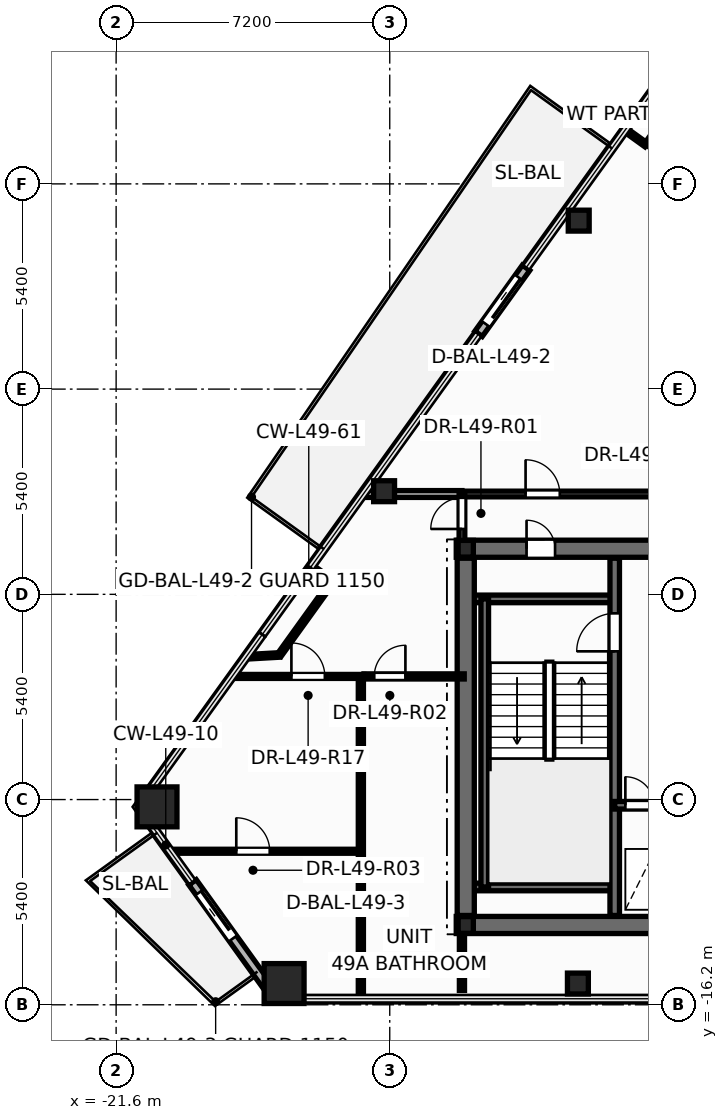
"""IFC4 building model, lengths in metres.
Left out: names, types, materials, properties, quantities, classifications, styles, units other than length and angle.
Written with IfcOpenShell. Run it as: python <this file> out.ifc"""

import sys

from ifc_helpers import new_model, si_unit, direction, frame, frame_2d, origin, origin_2d, place, context, subcontext, project, spatial, rectangle, hollow_rectangle, hollow_circle, i_section, extrude, element, fill, save


model = new_model("IFC4")
c1 = context("Model", 3, precision=1e-05, world=origin(), true_north=direction((0.0, 1.0)))
c2 = subcontext(c1, "Body", "Model", "MODEL_VIEW")
j1 = project(units=[si_unit("LENGTHUNIT", "METRE"), si_unit("PLANEANGLEUNIT", "RADIAN")], contexts=[c1])
p1 = place(None, origin())
s1 = spatial("IfcSite", under=j1, at=p1, CompositionType="ELEMENT")
p2 = place(p1, origin())
s2 = spatial("IfcBuilding", under=s1, at=p2, CompositionType="ELEMENT")
p3 = place(p2, frame((0.0, 0.0, 189.3)))
s3 = spatial("IfcBuildingStorey", under=s2, at=p3, CompositionType="ELEMENT", Elevation=189.3)
for number, where, z_axis, x_axis in (
    (1, (-20.524, -10.992, 0.0), (0.0, 0.0, 1.0), (1.0, 0.0, 0.0)),
    (2, (-17.18, -15.641, 0.0), (0.0, 0.0, 1.0), (1.0, 0.0, 0.0)),
):
    element("IfcColumn", number, at=place(p3, frame(where, z_axis=z_axis, x_axis=x_axis)), inside=s3, PredefinedType="COLUMN", context=c2, shape_type="SweptSolid", body=[
        extrude(hollow_rectangle(XDim=1.05, YDim=1.05, WallThickness=0.045, at=origin_2d()), origin(), (0.0, 0.0, 1.0), 3.6),
    ])
for number, where, z_axis, x_axis in (
    (3, (-9.449, -15.641, 0.0), (0.0, 0.0, 1.0), (1.0, 0.0, 0.0)),
    (4, (-9.427, 4.433, 0.0), (0.0, 0.0, 1.0), (1.0, 0.0, 0.0)),
    (5, (-14.549, -2.686, 0.0), (0.0, 0.0, 1.0), (1.0, 0.0, 0.0)),
):
    element("IfcColumn", number, at=place(p3, frame(where, z_axis=z_axis, x_axis=x_axis)), inside=s3, PredefinedType="COLUMN", context=c2, shape_type="SweptSolid", body=[
        extrude(hollow_circle(Radius=0.275, WallThickness=0.024, at=origin_2d()), origin(), (0.0, 0.0, 1.0), 3.6),
    ])
for number, where, z_axis, x_axis in (
    (6, (-12.4, -14.1, 0.0), (0.0, 0.0, 1.0), (1.0, 0.0, 0.0)),
    (7, (-12.4, -4.2, 0.0), (0.0, 0.0, 1.0), (1.0, 0.0, 0.0)),
):
    element("IfcColumn", number, at=place(p3, frame(where, z_axis=z_axis, x_axis=x_axis)), inside=s3, PredefinedType="COLUMN", context=c2, shape_type="SweptSolid", body=[
        extrude(i_section(OverallWidth=0.4, OverallDepth=0.44, WebThickness=0.028, FlangeThickness=0.04, at=origin_2d()), origin(), (0.0, 0.0, 1.0), 3.6),
    ])
p4 = place(p3, frame((-10.813, 3.192, -0.015), z_axis=(0.0, 0.0, 1.0), x_axis=(-0.583965085393, -0.811778774693, 0.0)))
e8 = element("IfcWall", 8, at=p4, inside=s3, PredefinedType="STANDARD", context=c2, shape_type="SweptSolid", body=[
    extrude(rectangle(XDim=2.14, YDim=0.24, at=frame_2d((1.07, 0.0))), origin(), (0.0, 0.0, 1.0), 2.807),
])
p5 = place(p4, frame((0.32, 0.0, 0.015)))
e9 = element("IfcOpeningElement", 9, at=p5, cuts=e8, PredefinedType="OPENING", context=c2, shape_type="SweptSolid", body=[
    extrude(rectangle(XDim=1.506, YDim=2.204, at=frame_2d((0.75, 1.102))), frame((0.0, 0.13, 0.0), z_axis=(0.0, -1.0, 0.0), x_axis=(1.0, 0.0, 0.0)), (0.0, 0.0, 1.0), 0.26),
])
p6 = place(p3, frame((-19.589, -12.977, -0.015), z_axis=(0.0, 0.0, 1.0), x_axis=(0.583992964187, -0.811758718943, 0.0)))
e10 = element("IfcWall", 10, at=p6, inside=s3, PredefinedType="STANDARD", context=c2, shape_type="SweptSolid", body=[
    extrude(rectangle(XDim=3.734, YDim=0.24, at=frame_2d((1.867, 0.0))), origin(), (0.0, 0.0, 1.0), 2.807),
])
p7 = place(p6, frame((0.32, 0.0, 0.015)))
e11 = element("IfcOpeningElement", 11, at=p7, cuts=e10, PredefinedType="OPENING", context=c2, shape_type="SweptSolid", body=[
    extrude(rectangle(XDim=1.506, YDim=2.204, at=frame_2d((0.75, 1.102))), frame((0.0, 0.13, 0.0), z_axis=(0.0, -1.0, 0.0), x_axis=(1.0, 0.0, 0.0)), (0.0, 0.0, 1.0), 0.26),
])
p8 = place(p3, frame((-12.65, -14.1, 0.0), z_axis=(0.0, 0.0, 1.0), x_axis=(1.0, 0.0, 0.0)))
e12 = element("IfcWall", 12, at=p8, inside=s3, PredefinedType="SHEAR", context=c2, shape_type="SweptSolid", body=[
    extrude(rectangle(XDim=25.3, YDim=0.45, at=frame_2d((12.65, 0.0))), origin(), (0.0, 0.0, 1.0), 3.6),
])
p9 = place(p3, frame((-12.65, -4.2, 0.0), z_axis=(0.0, 0.0, 1.0), x_axis=(1.0, 0.0, 0.0)))
e13 = element("IfcWall", 13, at=p9, inside=s3, PredefinedType="SHEAR", context=c2, shape_type="SweptSolid", body=[
    extrude(rectangle(XDim=25.3, YDim=0.45, at=frame_2d((12.65, 0.0))), origin(), (0.0, 0.0, 1.0), 3.6),
])
p10 = place(p9, frame((1.85, 0.0, 0.0)))
e14 = element("IfcOpeningElement", 14, at=p10, cuts=e13, PredefinedType="OPENING", context=c2, shape_type="SweptSolid", body=[
    extrude(rectangle(XDim=0.756, YDim=2.054, at=frame_2d((0.375, 1.027))), frame((0.0, 0.235, 0.0), z_axis=(0.0, -1.0, 0.0), x_axis=(1.0, 0.0, 0.0)), (0.0, 0.0, 1.0), 0.47),
])
p11 = place(p9, frame((21.85, 0.0, 0.0)))
e15 = element("IfcOpeningElement", 15, at=p11, cuts=e13, PredefinedType="OPENING", context=c2, shape_type="SweptSolid", body=[
    extrude(rectangle(XDim=0.756, YDim=2.054, at=frame_2d((0.375, 1.027))), frame((0.0, 0.235, 0.0), z_axis=(0.0, -1.0, 0.0), x_axis=(1.0, 0.0, 0.0)), (0.0, 0.0, 1.0), 0.47),
])
p12 = place(p9, frame((23.5, 0.0, 0.0)))
e16 = element("IfcOpeningElement", 16, at=p12, cuts=e13, PredefinedType="OPENING", context=c2, shape_type="SweptSolid", body=[
    extrude(rectangle(XDim=0.756, YDim=2.054, at=frame_2d((0.375, 1.027))), frame((0.0, 0.235, 0.0), z_axis=(0.0, -1.0, 0.0), x_axis=(1.0, 0.0, 0.0)), (0.0, 0.0, 1.0), 0.47),
])
p13 = place(p9, frame((5.85, 0.0, 0.0)))
e17 = element("IfcOpeningElement", 17, at=p13, cuts=e13, PredefinedType="OPENING", context=c2, shape_type="SweptSolid", body=[
    extrude(rectangle(XDim=1.006, YDim=2.104, at=frame_2d((0.5, 1.052))), frame((0.0, 0.235, 0.0), z_axis=(0.0, -1.0, 0.0), x_axis=(1.0, 0.0, 0.0)), (0.0, 0.0, 1.0), 0.47),
])
p14 = place(p9, frame((10.35, 0.0, 0.0)))
e18 = element("IfcOpeningElement", 18, at=p14, cuts=e13, PredefinedType="OPENING", context=c2, shape_type="SweptSolid", body=[
    extrude(rectangle(XDim=1.406, YDim=2.154, at=frame_2d((0.7, 1.077))), frame((0.0, 0.235, 0.0), z_axis=(0.0, -1.0, 0.0), x_axis=(1.0, 0.0, 0.0)), (0.0, 0.0, 1.0), 0.47),
])
p15 = place(p9, frame((18.45, 0.0, 0.0)))
e19 = element("IfcOpeningElement", 19, at=p15, cuts=e13, PredefinedType="OPENING", context=c2, shape_type="SweptSolid", body=[
    extrude(rectangle(XDim=1.006, YDim=2.104, at=frame_2d((0.5, 1.052))), frame((0.0, 0.235, 0.0), z_axis=(0.0, -1.0, 0.0), x_axis=(1.0, 0.0, 0.0)), (0.0, 0.0, 1.0), 0.47),
])
for number, where, z_axis, x_axis in (
    (20, (-12.35, -5.52, 0.0), (0.0, 0.0, 1.0), (1.0, 0.0, 0.0)),
    (21, (-12.35, -13.1, 0.0), (0.0, 0.0, 1.0), (1.0, 0.0, 0.0)),
):
    element("IfcWall", number, at=place(p3, frame(where, z_axis=z_axis, x_axis=x_axis)), inside=s3, PredefinedType="SOLIDWALL", context=c2, shape_type="SweptSolid", body=[
        extrude(rectangle(XDim=3.87, YDim=0.2, at=frame_2d((1.935, 0.0))), origin(), (0.0, 0.0, 1.0), 3.6),
    ])
p16 = place(p3, frame((-11.9, -13.1, 0.0), z_axis=(0.0, 0.0, 1.0), x_axis=(0.0, 1.0, 0.0)))
e22 = element("IfcWall", 22, at=p16, inside=s3, PredefinedType="SOLIDWALL", context=c2, shape_type="SweptSolid", body=[
    extrude(rectangle(XDim=7.58, YDim=0.2, at=frame_2d((3.79, 0.0))), origin(), (0.0, 0.0, 1.0), 3.6),
])
p17 = place(p3, frame((-8.48, -13.85, 0.0), z_axis=(0.0, 0.0, 1.0), x_axis=(0.0, 1.0, 0.0)))
e23 = element("IfcWall", 23, at=p17, inside=s3, PredefinedType="SHEAR", context=c2, shape_type="SweptSolid", body=[
    extrude(rectangle(XDim=9.4, YDim=0.25, at=frame_2d((4.7, 0.0))), origin(), (0.0, 0.0, 1.0), 3.6),
])
p18 = place(p17, frame((6.95, 0.0, 0.0)))
e24 = element("IfcOpeningElement", 24, at=p18, cuts=e23, PredefinedType="OPENING", context=c2, shape_type="SweptSolid", body=[
    extrude(rectangle(XDim=1.006, YDim=2.104, at=frame_2d((0.5, 1.052))), frame((0.0, 0.135, 0.0), z_axis=(0.0, -1.0, 0.0), x_axis=(1.0, 0.0, 0.0)), (0.0, 0.0, 1.0), 0.27),
])
p19 = place(p3, frame((-8.48, -10.95, 0.0), z_axis=(0.0, 0.0, 1.0), x_axis=(1.0, 0.0, 0.0)))
e25 = element("IfcWall", 25, at=p19, inside=s3, PredefinedType="SOLIDWALL", context=c2, shape_type="SweptSolid", body=[
    extrude(rectangle(XDim=3.36, YDim=0.2, at=frame_2d((1.68, 0.0))), origin(), (0.0, 0.0, 1.0), 3.6),
])
p20 = place(p19, frame((0.28, 0.0, 0.0)))
e26 = element("IfcOpeningElement", 26, at=p20, cuts=e25, PredefinedType="OPENING", context=c2, shape_type="SweptSolid", body=[
    extrude(rectangle(XDim=0.756, YDim=2.054, at=frame_2d((0.375, 1.027))), frame((0.0, 0.11, 0.0), z_axis=(0.0, -1.0, 0.0), x_axis=(1.0, 0.0, 0.0)), (0.0, 0.0, 1.0), 0.22),
])
p21 = place(p19, frame((1.85, 0.0, 0.0)))
e27 = element("IfcOpeningElement", 27, at=p21, cuts=e25, PredefinedType="OPENING", context=c2, shape_type="SweptSolid", body=[
    extrude(rectangle(XDim=1.106, YDim=2.104, at=frame_2d((0.55, 1.052))), frame((0.0, 0.11, 0.0), z_axis=(0.0, -1.0, 0.0), x_axis=(1.0, 0.0, 0.0)), (0.0, 0.0, 1.0), 0.22),
])
p22 = place(p3, frame((-12.4, -13.85, 0.0), z_axis=(0.0, 0.0, 1.0), x_axis=(0.0, 1.0, 0.0)))
e28 = element("IfcWall", 28, at=p22, inside=s3, PredefinedType="SHEAR", context=c2, shape_type="SweptSolid", body=[
    extrude(rectangle(XDim=9.4, YDim=0.45, at=frame_2d((4.7, 0.0))), origin(), (0.0, 0.0, 1.0), 3.6),
])
p23 = place(p3, frame((-12.5, -2.76, 0.0), z_axis=(0.0, 0.0, 1.0), x_axis=(1.0, 0.0, 0.0)))
e29 = element("IfcWall", 29, at=p23, inside=s3, PredefinedType="PARTITIONING", context=c2, shape_type="SweptSolid", body=[
    extrude(rectangle(XDim=6.76, YDim=0.15, at=frame_2d((3.38, 0.0))), origin(), (0.0, 0.0, 1.0), 2.325),
])
p24 = place(p23, frame((1.675, 0.0, 0.0)))
e30 = element("IfcOpeningElement", 30, at=p24, cuts=e29, PredefinedType="OPENING", context=c2, shape_type="SweptSolid", body=[
    extrude(rectangle(XDim=0.906, YDim=2.104, at=frame_2d((0.45, 1.052))), frame((0.0, 0.085, 0.0), z_axis=(0.0, -1.0, 0.0), x_axis=(1.0, 0.0, 0.0)), (0.0, 0.0, 1.0), 0.17),
])
p25 = place(p3, frame((-20.177, -12.16, 0.0), z_axis=(0.0, 0.0, 1.0), x_axis=(1.0, 0.0, 0.0)))
e31 = element("IfcWall", 31, at=p25, inside=s3, PredefinedType="PARTITIONING", context=c2, shape_type="SweptSolid", body=[
    extrude(rectangle(XDim=5.017, YDim=0.105, at=frame_2d((2.508, 0.0))), origin(), (0.0, 0.0, 1.0), 2.792),
])
p26 = place(p25, frame((1.739, 0.0, 0.0)))
e32 = element("IfcOpeningElement", 32, at=p26, cuts=e31, PredefinedType="OPENING", context=c2, shape_type="SweptSolid", body=[
    extrude(rectangle(XDim=0.886, YDim=2.104, at=frame_2d((0.44, 1.052))), frame((0.0, 0.062, 0.0), z_axis=(0.0, -1.0, 0.0), x_axis=(1.0, 0.0, 0.0)), (0.0, 0.0, 1.0), 0.125),
])
p27 = place(p3, frame((-15.16, -16.041, 0.0), z_axis=(0.0, 0.0, 1.0), x_axis=(0.0, 1.0, 0.0)))
e33 = element("IfcWall", 33, at=p27, inside=s3, PredefinedType="PARTITIONING", context=c2, shape_type="SweptSolid", body=[
    extrude(rectangle(XDim=8.481, YDim=0.135, at=frame_2d((4.24, 0.0))), origin(), (0.0, 0.0, 1.0), 2.792),
])
p28 = place(p3, frame((-18.548, -7.56, 0.0), z_axis=(0.0, 0.0, 1.0), x_axis=(1.0, 0.0, 0.0)))
e34 = element("IfcWall", 34, at=p28, inside=s3, PredefinedType="PARTITIONING", context=c2, shape_type="SweptSolid", body=[
    extrude(rectangle(XDim=3.468, YDim=0.105, at=frame_2d((1.734, 0.0))), origin(), (0.0, 0.0, 1.0), 2.325),
])
p29 = place(p28, frame((1.56, 0.0, 0.0)))
e35 = element("IfcOpeningElement", 35, at=p29, cuts=e34, PredefinedType="OPENING", context=c2, shape_type="SweptSolid", body=[
    extrude(rectangle(XDim=0.886, YDim=2.104, at=frame_2d((0.44, 1.052))), frame((0.0, 0.062, 0.0), z_axis=(0.0, -1.0, 0.0), x_axis=(1.0, 0.0, 0.0)), (0.0, 0.0, 1.0), 0.125),
])
p30 = place(p3, frame((-15.078, -7.56, 0.0), z_axis=(0.0, 0.0, 1.0), x_axis=(1.0, 0.0, 0.0)))
e36 = element("IfcWall", 36, at=p30, inside=s3, PredefinedType="PARTITIONING", context=c2, shape_type="SweptSolid", body=[
    extrude(rectangle(XDim=2.638, YDim=0.135, at=frame_2d((1.319, 0.0))), origin(), (0.0, 0.0, 1.0), 2.792),
])
p31 = place(p30, frame((0.271, 0.0, 0.0)))
e37 = element("IfcOpeningElement", 37, at=p31, cuts=e36, PredefinedType="OPENING", context=c2, shape_type="SweptSolid", body=[
    extrude(rectangle(XDim=0.826, YDim=2.104, at=frame_2d((0.41, 1.052))), frame((0.0, 0.078, 0.0), z_axis=(0.0, -1.0, 0.0), x_axis=(1.0, 0.0, 0.0)), (0.0, 0.0, 1.0), 0.155),
])
p32 = place(p3, frame((-15.095, -2.76, 0.0), z_axis=(0.0, 0.0, 1.0), x_axis=(1.0, 0.0, 0.0)))
e38 = element("IfcWall", 38, at=p32, inside=s3, PredefinedType="PARTITIONING", context=c2, shape_type="SweptSolid", body=[
    extrude(rectangle(XDim=2.595, YDim=0.18, at=frame_2d((1.297, 0.0))), origin(), (0.0, 0.0, 1.0), 2.625),
])
p33 = place(p3, frame((-15.915, -5.064, 0.0), z_axis=(0.0, 0.0, 1.0), x_axis=(-0.58403154631, -0.811730960919, 0.0)))
e39 = element("IfcWall", 39, at=p33, inside=s3, PredefinedType="PARTITIONING", context=c2, shape_type="SweptSolid", body=[
    extrude(rectangle(XDim=2.378, YDim=0.12, at=frame_2d((1.189, 0.0))), origin(), (0.0, 0.0, 1.0), 3.35),
])
p34 = place(p3, frame((-6.261, 8.354, 0.0), z_axis=(0.0, 0.0, 1.0), x_axis=(-0.583963896956, -0.811779629611, 0.0)))
e40 = element("IfcWall", 40, at=p34, inside=s3, PredefinedType="PARTITIONING", context=c2, shape_type="SweptSolid", body=[
    extrude(rectangle(XDim=2.378, YDim=0.12, at=frame_2d((1.189, 0.0))), origin(), (0.0, 0.0, 1.0), 3.35),
])
p35 = place(p3, frame((-12.5, -4.24, 0.0), z_axis=(0.0, 0.0, 1.0), x_axis=(0.0, 1.0, 0.0)))
e41 = element("IfcWall", 41, at=p35, inside=s3, PredefinedType="PARTITIONING", context=c2, shape_type="SweptSolid", body=[
    extrude(rectangle(XDim=1.48, YDim=0.15, at=frame_2d((0.74, 0.0))), origin(), (0.0, 0.0, 1.0), 2.325),
])
p36 = place(p35, frame((0.56, 0.0, 0.0)))
e42 = element("IfcOpeningElement", 42, at=p36, cuts=e41, PredefinedType="OPENING", context=c2, shape_type="SweptSolid", body=[
    extrude(rectangle(XDim=0.826, YDim=2.104, at=frame_2d((0.41, 1.052))), frame((0.0, 0.085, 0.0), z_axis=(0.0, -1.0, 0.0), x_axis=(1.0, 0.0, 0.0)), (0.0, 0.0, 1.0), 0.17),
])
p37 = place(p3, frame((-17.304, -6.995, 0.0), z_axis=(0.0, 0.0, 1.0), x_axis=(-0.998378240711, -0.056928801811, 0.0)))
e43 = element("IfcWall", 43, at=p37, inside=s3, PredefinedType="PARTITIONING", context=c2, shape_type="SweptSolid", body=[
    extrude(rectangle(XDim=0.862, YDim=0.12, at=frame_2d((0.431, 0.0))), origin(), (0.0, 0.0, 1.0), 2.792),
])
p38 = place(p3, frame((-7.65, 6.424, 0.0), z_axis=(0.0, 0.0, 1.0), x_axis=(-0.811734696256, 0.584026354622, 0.0)))
e44 = element("IfcWall", 44, at=p38, inside=s3, PredefinedType="PARTITIONING", context=c2, shape_type="SweptSolid", body=[
    extrude(rectangle(XDim=0.67, YDim=0.12, at=frame_2d((0.335, 0.0))), origin(), (0.0, 0.0, 1.0), 2.792),
])
p39 = place(p3, frame((-16.459, -4.673, 0.0), z_axis=(0.0, 0.0, 1.0), x_axis=(0.811907418628, -0.583786213932, 0.0)))
e45 = element("IfcWall", 45, at=p39, inside=s3, PredefinedType="PARTITIONING", context=c2, shape_type="SweptSolid", body=[
    extrude(rectangle(XDim=0.67, YDim=0.12, at=frame_2d((0.335, 0.0))), origin(), (0.0, 0.0, 1.0), 2.792),
])
p40 = place(p3, frame((-12.5, -14.4, 0.0), z_axis=(0.0, 0.0, 1.0), x_axis=(0.0, -1.0, 0.0)))
e46 = element("IfcWall", 46, at=p40, inside=s3, PredefinedType="PARTITIONING", context=c2, shape_type="SweptSolid", body=[
    extrude(rectangle(XDim=1.421, YDim=0.135, at=frame_2d((0.71, 0.0))), origin(), (0.0, 0.0, 1.0), 2.792),
])
p41 = place(p5, origin())
e47 = element("IfcDoor", 47, at=p41, inside=s3, OperationType="SLIDING_TO_RIGHT", PredefinedType="DOOR", context=c2, shape_type="SweptSolid", body=[
    extrude(rectangle(XDim=1.5, YDim=2.2, at=frame_2d((0.75, 1.1))), frame((0.0, 0.025, 0.0), z_axis=(0.0, -1.0, 0.0), x_axis=(1.0, 0.0, 0.0)), (0.0, 0.0, 1.0), 0.05),
])
fill(e9, e47)
p42 = place(p7, origin())
e48 = element("IfcDoor", 48, at=p42, inside=s3, OperationType="SLIDING_TO_RIGHT", PredefinedType="DOOR", context=c2, shape_type="SweptSolid", body=[
    extrude(rectangle(XDim=1.5, YDim=2.2, at=frame_2d((0.75, 1.1))), frame((0.0, 0.025, 0.0), z_axis=(0.0, -1.0, 0.0), x_axis=(1.0, 0.0, 0.0)), (0.0, 0.0, 1.0), 0.05),
])
fill(e11, e48)
p43 = place(p18, origin())
e49 = element("IfcDoor", 49, at=p43, inside=s3, OperationType="SINGLE_SWING_LEFT", PredefinedType="DOOR", context=c2, shape_type="SweptSolid", body=[
    extrude(rectangle(XDim=1.0, YDim=2.1, at=frame_2d((0.5, 1.05))), frame((0.0, 0.025, 0.0), z_axis=(0.0, -1.0, 0.0), x_axis=(1.0, 0.0, 0.0)), (0.0, 0.0, 1.0), 0.05),
])
fill(e24, e49)
p44 = place(p20, origin())
e50 = element("IfcDoor", 50, at=p44, inside=s3, OperationType="SINGLE_SWING_LEFT", PredefinedType="DOOR", context=c2, shape_type="SweptSolid", body=[
    extrude(rectangle(XDim=0.75, YDim=2.05, at=frame_2d((0.375, 1.025))), frame((0.0, 0.025, 0.0), z_axis=(0.0, -1.0, 0.0), x_axis=(1.0, 0.0, 0.0)), (0.0, 0.0, 1.0), 0.05),
])
fill(e26, e50)
p45 = place(p10, origin())
e51 = element("IfcDoor", 51, at=p45, inside=s3, OperationType="SINGLE_SWING_LEFT", PredefinedType="DOOR", context=c2, shape_type="SweptSolid", body=[
    extrude(rectangle(XDim=0.75, YDim=2.05, at=frame_2d((0.375, 1.025))), frame((0.0, 0.025, 0.0), z_axis=(0.0, -1.0, 0.0), x_axis=(1.0, 0.0, 0.0)), (0.0, 0.0, 1.0), 0.05),
])
fill(e14, e51)
p46 = place(p36, origin())
e52 = element("IfcDoor", 52, at=p46, inside=s3, OperationType="SINGLE_SWING_LEFT", PredefinedType="DOOR", context=c2, shape_type="SweptSolid", body=[
    extrude(rectangle(XDim=0.82, YDim=2.1, at=frame_2d((0.41, 1.05))), frame((0.0, 0.025, 0.0), z_axis=(0.0, -1.0, 0.0), x_axis=(1.0, 0.0, 0.0)), (0.0, 0.0, 1.0), 0.05),
])
fill(e42, e52)
p47 = place(p31, origin())
e53 = element("IfcDoor", 53, at=p47, inside=s3, OperationType="SINGLE_SWING_RIGHT", PredefinedType="DOOR", context=c2, shape_type="SweptSolid", body=[
    extrude(rectangle(XDim=0.82, YDim=2.1, at=frame_2d((0.41, 1.05))), frame((0.0, 0.025, 0.0), z_axis=(0.0, -1.0, 0.0), x_axis=(1.0, 0.0, 0.0)), (0.0, 0.0, 1.0), 0.05),
])
fill(e37, e53)
p48 = place(p26, origin())
e54 = element("IfcDoor", 54, at=p48, inside=s3, OperationType="SINGLE_SWING_LEFT", PredefinedType="DOOR", context=c2, shape_type="SweptSolid", body=[
    extrude(rectangle(XDim=0.88, YDim=2.1, at=frame_2d((0.44, 1.05))), frame((0.0, 0.025, 0.0), z_axis=(0.0, -1.0, 0.0), x_axis=(1.0, 0.0, 0.0)), (0.0, 0.0, 1.0), 0.05),
])
fill(e32, e54)
p49 = place(p24, origin())
e55 = element("IfcDoor", 55, at=p49, inside=s3, OperationType="SINGLE_SWING_LEFT", PredefinedType="DOOR", context=c2, shape_type="SweptSolid", body=[
    extrude(rectangle(XDim=0.9, YDim=2.1, at=frame_2d((0.45, 1.05))), frame((0.0, 0.025, 0.0), z_axis=(0.0, -1.0, 0.0), x_axis=(1.0, 0.0, 0.0)), (0.0, 0.0, 1.0), 0.05),
])
fill(e30, e55)
p50 = place(p29, origin())
e56 = element("IfcDoor", 56, at=p50, inside=s3, OperationType="SINGLE_SWING_LEFT", PredefinedType="DOOR", context=c2, shape_type="SweptSolid", body=[
    extrude(rectangle(XDim=0.88, YDim=2.1, at=frame_2d((0.44, 1.05))), frame((0.0, 0.025, 0.0), z_axis=(0.0, -1.0, 0.0), x_axis=(1.0, 0.0, 0.0)), (0.0, 0.0, 1.0), 0.05),
])
fill(e35, e56)
save(model, sys.argv[1])
